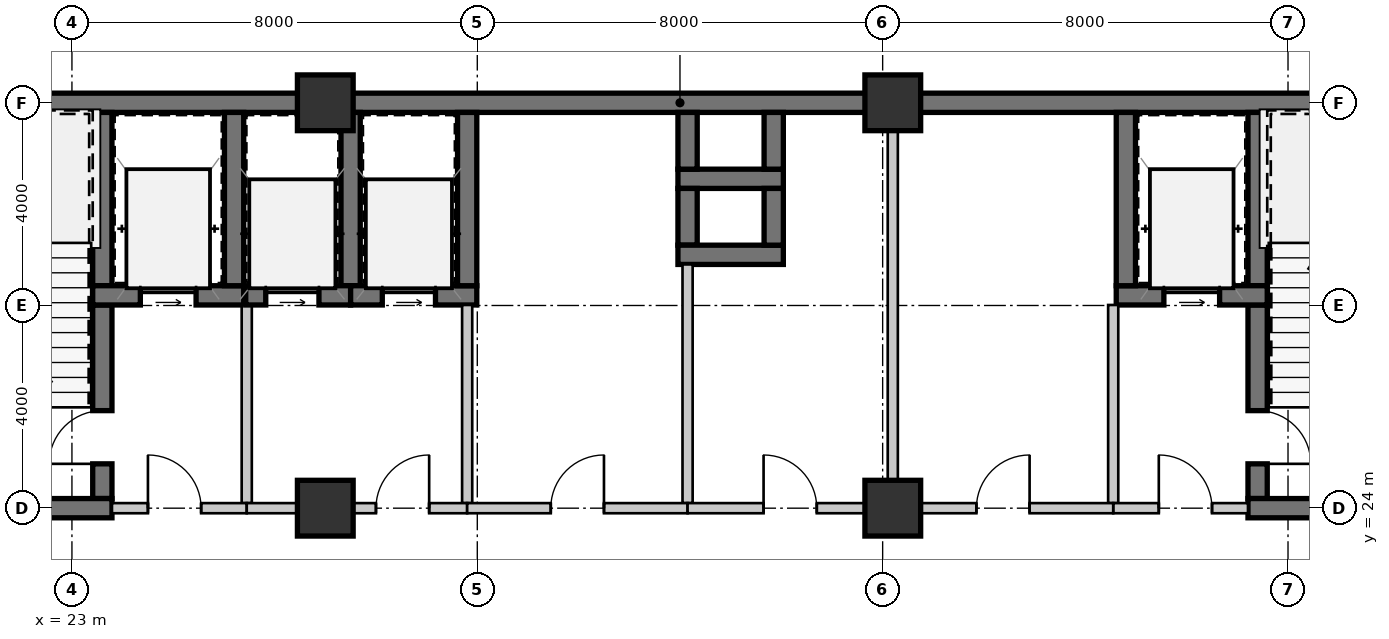
"""IFC4 building model, lengths in metres.
Left out: names, types, materials, properties, quantities, classifications, styles, units other than length and angle.
Written with IfcOpenShell. Run it as: python <this file> out.ifc"""

import sys

from ifc_helpers import new_model, si_unit, direction, frame, frame_2d, origin, origin_2d, place, context, subcontext, project, spatial, rectangle, extrude, source, transform, mapped, element, fill, save


model = new_model("IFC4")
c1 = context("Model", 3, precision=1e-05, world=origin(), true_north=direction((0.0, 1.0)))
c2 = subcontext(c1, "Body", "Model", "MODEL_VIEW")
j1 = project(units=[si_unit("LENGTHUNIT", "METRE"), si_unit("PLANEANGLEUNIT", "RADIAN")], contexts=[c1])
p1 = place(None, origin())
s1 = spatial("IfcSite", under=j1, at=p1, CompositionType="ELEMENT")
p2 = place(p1, origin())
s2 = spatial("IfcBuilding", under=s1, at=p2, CompositionType="ELEMENT")
p3 = place(p2, frame((0.0, 0.0, -4.0)))
s3 = spatial("IfcBuildingStorey", under=s2, at=p3, CompositionType="ELEMENT", Elevation=-4.0)
m1 = source(origin(), c2, "Body", "SweptSolid", [
    extrude(rectangle(XDim=1.1, YDim=1.1, at=origin_2d()), origin(), (0.0, 0.0, 1.0), 4.0),
])
for number, where, z_axis, x_axis in (
    (1, (28.0, 24.0, 0.0), (0.0, 0.0, 1.0), (1.0, 0.0, 0.0)),
    (2, (39.2, 24.0, 0.0), (0.0, 0.0, 1.0), (1.0, 0.0, 0.0)),
    (3, (28.0, 32.0, 0.0), (0.0, 0.0, 1.0), (1.0, 0.0, 0.0)),
    (4, (39.2, 32.0, 0.0), (0.0, 0.0, 1.0), (1.0, 0.0, 0.0)),
):
    element("IfcColumn", number, at=place(p3, frame(where, z_axis=z_axis, x_axis=x_axis)), inside=s3, PredefinedType="COLUMN", context=c2, shape_type="MappedRepresentation", body=[
        mapped(m1, transform((0.0, 0.0, 0.0), scale=1.0)),
    ])
m2 = source(origin(), c2, "Body", "SweptSolid", [
    extrude(rectangle(XDim=9.19, YDim=0.38, at=frame_2d((4.595, 0.0))), origin(), (0.0, 0.0, 1.0), 3.74),
])
p4 = place(p3, frame((18.81, 32.0, 0.0), z_axis=(0.0, 0.0, 1.0), x_axis=(1.0, 0.0, 0.0)))
e5 = element("IfcWall", 5, at=p4, inside=s3, PredefinedType="SHEAR", context=c2, shape_type="MappedRepresentation", body=[
    mapped(m2, transform((0.0, 0.0, 0.0), scale=1.0)),
])
m3 = source(origin(), c2, "Body", "SweptSolid", [
    extrude(rectangle(XDim=11.2, YDim=0.38, at=frame_2d((5.6, 0.0))), origin(), (0.0, 0.0, 1.0), 3.74),
])
p5 = place(p3, frame((28.0, 32.0, 0.0), z_axis=(0.0, 0.0, 1.0), x_axis=(1.0, 0.0, 0.0)))
e6 = element("IfcWall", 6, at=p5, inside=s3, PredefinedType="SHEAR", context=c2, shape_type="MappedRepresentation", body=[
    mapped(m3, transform((0.0, 0.0, 0.0), scale=1.0)),
])
m4 = source(origin(), c2, "Body", "SweptSolid", [
    extrude(rectangle(XDim=11.99, YDim=0.38, at=frame_2d((5.995, 0.0))), origin(), (0.0, 0.0, 1.0), 3.74),
])
p6 = place(p3, frame((39.2, 32.0, 0.0), z_axis=(0.0, 0.0, 1.0), x_axis=(1.0, 0.0, 0.0)))
e7 = element("IfcWall", 7, at=p6, inside=s3, PredefinedType="SHEAR", context=c2, shape_type="MappedRepresentation", body=[
    mapped(m4, transform((0.0, 0.0, 0.0), scale=1.0)),
])
m5 = source(origin(), c2, "Body", "SweptSolid", [
    extrude(rectangle(XDim=3.42, YDim=0.38, at=frame_2d((1.71, 0.0))), origin(), (0.0, 0.0, 1.0), 3.74),
])
p7 = place(p3, frame((23.6, 28.39, 0.0), z_axis=(0.0, 0.0, 1.0), x_axis=(0.0, 1.0, 0.0)))
e8 = element("IfcWall", 8, at=p7, inside=s3, PredefinedType="SHEAR", context=c2, shape_type="MappedRepresentation", body=[
    mapped(m5, transform((0.0, 0.0, 0.0), scale=1.0)),
])
m6 = source(origin(), c2, "Body", "SweptSolid", [
    extrude(rectangle(XDim=3.82, YDim=0.38, at=frame_2d((1.91, 0.0))), origin(), (0.0, 0.0, 1.0), 3.74),
])
p8 = place(p3, frame((23.6, 24.19, 0.0), z_axis=(0.0, 0.0, 1.0), x_axis=(0.0, 1.0, 0.0)))
e9 = element("IfcWall", 9, at=p8, inside=s3, PredefinedType="SHEAR", context=c2, shape_type="MappedRepresentation", body=[
    mapped(m6, transform((0.0, 0.0, 0.0), scale=1.0)),
])
m7 = source(origin(), c2, "Body", "SweptSolid", [
    extrude(rectangle(XDim=1.05, YDim=2.1, at=frame_2d((0.525, 1.05))), frame((0.0, 0.2, 0.0), z_axis=(0.0, -1.0, 0.0), x_axis=(1.0, 0.0, 0.0)), (0.0, 0.0, 1.0), 0.4),
])
p9 = place(p8, frame((0.685, 0.0, 0.0)))
e10 = element("IfcOpeningElement", 10, at=p9, cuts=e9, PredefinedType="OPENING", context=c2, shape_type="MappedRepresentation", body=[
    mapped(m7, transform((0.0, 0.0, 0.0), scale=1.0)),
])
m8 = source(origin(), c2, "Body", "SweptSolid", [
    extrude(rectangle(XDim=4.98, YDim=0.38, at=frame_2d((2.49, 0.0))), origin(), (0.0, 0.0, 1.0), 3.74),
])
p10 = place(p3, frame((18.81, 24.0, 0.0), z_axis=(0.0, 0.0, 1.0), x_axis=(1.0, 0.0, 0.0)))
e11 = element("IfcWall", 11, at=p10, inside=s3, PredefinedType="SHEAR", context=c2, shape_type="MappedRepresentation", body=[
    mapped(m8, transform((0.0, 0.0, 0.0), scale=1.0)),
])
m9 = source(origin(), c2, "Body", "SweptSolid", [
    extrude(rectangle(XDim=2.98, YDim=0.38, at=frame_2d((1.49, 0.0))), origin(), (0.0, 0.0, 1.0), 3.74),
])
p11 = place(p3, frame((23.41, 28.2, 0.0), z_axis=(0.0, 0.0, 1.0), x_axis=(1.0, 0.0, 0.0)))
e12 = element("IfcWall", 12, at=p11, inside=s3, PredefinedType="SHEAR", context=c2, shape_type="MappedRepresentation", body=[
    mapped(m9, transform((0.0, 0.0, 0.0), scale=1.0)),
])
m10 = source(origin(), c2, "Body", "SweptSolid", [
    extrude(rectangle(XDim=1.1, YDim=2.15, at=frame_2d((0.55, 1.075))), frame((0.0, 0.2, 0.0), z_axis=(0.0, -1.0, 0.0), x_axis=(1.0, 0.0, 0.0)), (0.0, 0.0, 1.0), 0.4),
])
p12 = place(p11, frame((0.94, 0.0, 0.0)))
e13 = element("IfcOpeningElement", 13, at=p12, cuts=e12, PredefinedType="OPENING", context=c2, shape_type="MappedRepresentation", body=[
    mapped(m10, transform((0.0, 0.0, 0.0), scale=1.0)),
])
p13 = place(p3, frame((26.2, 28.39, 0.0), z_axis=(0.0, 0.0, 1.0), x_axis=(0.0, 1.0, 0.0)))
e14 = element("IfcWall", 14, at=p13, inside=s3, PredefinedType="SHEAR", context=c2, shape_type="MappedRepresentation", body=[
    mapped(m5, transform((0.0, 0.0, 0.0), scale=1.0)),
])
m11 = source(origin(), c2, "Body", "SweptSolid", [
    extrude(rectangle(XDim=3.91, YDim=0.2, at=frame_2d((1.955, 0.0))), origin(), (0.0, 0.0, 1.0), 3.74),
])
p14 = place(p3, frame((26.45, 24.1, 0.0), z_axis=(0.0, 0.0, 1.0), x_axis=(0.0, 1.0, 0.0)))
e15 = element("IfcWall", 15, at=p14, inside=s3, PredefinedType="SOLIDWALL", context=c2, shape_type="MappedRepresentation", body=[
    mapped(m11, transform((0.0, 0.0, 0.0), scale=1.0)),
])
m12 = source(origin(), c2, "Body", "SweptSolid", [
    extrude(rectangle(XDim=2.66, YDim=0.2, at=frame_2d((1.33, 0.0))), origin(), (0.0, 0.0, 1.0), 3.28),
])
p15 = place(p3, frame((23.79, 24.0, 0.0), z_axis=(0.0, 0.0, 1.0), x_axis=(1.0, 0.0, 0.0)))
e16 = element("IfcWall", 16, at=p15, inside=s3, PredefinedType="SOLIDWALL", context=c2, shape_type="MappedRepresentation", body=[
    mapped(m12, transform((0.0, 0.0, 0.0), scale=1.0)),
])
m13 = source(origin(), c2, "Body", "SweptSolid", [
    extrude(rectangle(XDim=1.05, YDim=2.1, at=frame_2d((0.525, 1.05))), frame((0.0, 0.11, 0.0), z_axis=(0.0, -1.0, 0.0), x_axis=(1.0, 0.0, 0.0)), (0.0, 0.0, 1.0), 0.22),
])
p16 = place(p15, frame((0.71, 0.0, 0.0)))
e17 = element("IfcOpeningElement", 17, at=p16, cuts=e16, PredefinedType="OPENING", context=c2, shape_type="MappedRepresentation", body=[
    mapped(m13, transform((0.0, 0.0, 0.0), scale=1.0)),
])
p17 = place(p3, frame((46.4, 31.81, 0.0), z_axis=(0.0, 0.0, 1.0), x_axis=(0.0, -1.0, 0.0)))
e18 = element("IfcWall", 18, at=p17, inside=s3, PredefinedType="SHEAR", context=c2, shape_type="MappedRepresentation", body=[
    mapped(m5, transform((0.0, 0.0, 0.0), scale=1.0)),
])
p18 = place(p3, frame((46.4, 28.01, 0.0), z_axis=(0.0, 0.0, 1.0), x_axis=(0.0, -1.0, 0.0)))
e19 = element("IfcWall", 19, at=p18, inside=s3, PredefinedType="SHEAR", context=c2, shape_type="MappedRepresentation", body=[
    mapped(m6, transform((0.0, 0.0, 0.0), scale=1.0)),
])
p19 = place(p18, frame((2.085, 0.0, 0.0)))
e20 = element("IfcOpeningElement", 20, at=p19, cuts=e19, PredefinedType="OPENING", context=c2, shape_type="MappedRepresentation", body=[
    mapped(m7, transform((0.0, 0.0, 0.0), scale=1.0)),
])
p20 = place(p3, frame((46.21, 24.0, 0.0), z_axis=(0.0, 0.0, 1.0), x_axis=(1.0, 0.0, 0.0)))
e21 = element("IfcWall", 21, at=p20, inside=s3, PredefinedType="SHEAR", context=c2, shape_type="MappedRepresentation", body=[
    mapped(m8, transform((0.0, 0.0, 0.0), scale=1.0)),
])
p21 = place(p3, frame((43.61, 28.2, 0.0), z_axis=(0.0, 0.0, 1.0), x_axis=(1.0, 0.0, 0.0)))
e22 = element("IfcWall", 22, at=p21, inside=s3, PredefinedType="SHEAR", context=c2, shape_type="MappedRepresentation", body=[
    mapped(m9, transform((0.0, 0.0, 0.0), scale=1.0)),
])
p22 = place(p21, frame((0.94, 0.0, 0.0)))
e23 = element("IfcOpeningElement", 23, at=p22, cuts=e22, PredefinedType="OPENING", context=c2, shape_type="MappedRepresentation", body=[
    mapped(m10, transform((0.0, 0.0, 0.0), scale=1.0)),
])
p23 = place(p3, frame((43.8, 31.81, 0.0), z_axis=(0.0, 0.0, 1.0), x_axis=(0.0, -1.0, 0.0)))
e24 = element("IfcWall", 24, at=p23, inside=s3, PredefinedType="SHEAR", context=c2, shape_type="MappedRepresentation", body=[
    mapped(m5, transform((0.0, 0.0, 0.0), scale=1.0)),
])
p24 = place(p3, frame((43.55, 28.01, 0.0), z_axis=(0.0, 0.0, 1.0), x_axis=(0.0, -1.0, 0.0)))
e25 = element("IfcWall", 25, at=p24, inside=s3, PredefinedType="SOLIDWALL", context=c2, shape_type="MappedRepresentation", body=[
    mapped(m11, transform((0.0, 0.0, 0.0), scale=1.0)),
])
m14 = source(origin(), c2, "Body", "SweptSolid", [
    extrude(rectangle(XDim=2.66, YDim=0.2, at=frame_2d((1.33, 0.0))), origin(), (0.0, 0.0, 1.0), 3.207),
])
p25 = place(p3, frame((43.55, 24.0, 0.0), z_axis=(0.0, 0.0, 1.0), x_axis=(1.0, 0.0, 0.0)))
e26 = element("IfcWall", 26, at=p25, inside=s3, PredefinedType="SOLIDWALL", context=c2, shape_type="MappedRepresentation", body=[
    mapped(m14, transform((0.0, 0.0, 0.0), scale=1.0)),
])
p26 = place(p25, frame((0.9, 0.0, 0.0)))
e27 = element("IfcOpeningElement", 27, at=p26, cuts=e26, PredefinedType="OPENING", context=c2, shape_type="MappedRepresentation", body=[
    mapped(m13, transform((0.0, 0.0, 0.0), scale=1.0)),
])
m15 = source(origin(), c2, "Body", "SweptSolid", [
    extrude(rectangle(XDim=2.08, YDim=0.38, at=frame_2d((1.04, 0.0))), origin(), (0.0, 0.0, 1.0), 3.74),
])
p27 = place(p3, frame((34.96, 30.5, 0.0), z_axis=(0.0, 0.0, 1.0), x_axis=(1.0, 0.0, 0.0)))
e28 = element("IfcWall", 28, at=p27, inside=s3, PredefinedType="SHEAR", context=c2, shape_type="MappedRepresentation", body=[
    mapped(m15, transform((0.0, 0.0, 0.0), scale=1.0)),
])
m16 = source(origin(), c2, "Body", "SweptSolid", [
    extrude(rectangle(XDim=1.12, YDim=0.38, at=frame_2d((0.56, 0.0))), origin(), (0.0, 0.0, 1.0), 3.74),
])
for number, where, z_axis, x_axis in (
    (29, (35.15, 31.81, 0.0), (0.0, 0.0, 1.0), (0.0, -1.0, 0.0)),
    (30, (36.85, 30.69, 0.0), (0.0, 0.0, 1.0), (0.0, 1.0, 0.0)),
    (31, (35.15, 30.31, 0.0), (0.0, 0.0, 1.0), (0.0, -1.0, 0.0)),
):
    element("IfcWall", number, at=place(p3, frame(where, z_axis=z_axis, x_axis=x_axis)), inside=s3, PredefinedType="SHEAR", context=c2, shape_type="MappedRepresentation", body=[
        mapped(m16, transform((0.0, 0.0, 0.0), scale=1.0)),
    ])
p28 = place(p3, frame((34.96, 29.0, 0.0), z_axis=(0.0, 0.0, 1.0), x_axis=(1.0, 0.0, 0.0)))
e32 = element("IfcWall", 32, at=p28, inside=s3, PredefinedType="SHEAR", context=c2, shape_type="MappedRepresentation", body=[
    mapped(m15, transform((0.0, 0.0, 0.0), scale=1.0)),
])
p29 = place(p3, frame((36.85, 29.19, 0.0), z_axis=(0.0, 0.0, 1.0), x_axis=(0.0, 1.0, 0.0)))
e33 = element("IfcWall", 33, at=p29, inside=s3, PredefinedType="SHEAR", context=c2, shape_type="MappedRepresentation", body=[
    mapped(m16, transform((0.0, 0.0, 0.0), scale=1.0)),
])
p30 = place(p3, frame((28.5, 28.39, 0.0), z_axis=(0.0, 0.0, 1.0), x_axis=(0.0, 1.0, 0.0)))
e34 = element("IfcWall", 34, at=p30, inside=s3, PredefinedType="SHEAR", context=c2, shape_type="MappedRepresentation", body=[
    mapped(m5, transform((0.0, 0.0, 0.0), scale=1.0)),
])
m17 = source(origin(), c2, "Body", "SweptSolid", [
    extrude(rectangle(XDim=2.07, YDim=0.38, at=frame_2d((1.035, 0.0))), origin(), (0.0, 0.0, 1.0), 3.74),
])
p31 = place(p3, frame((26.43, 28.2, 0.0), z_axis=(0.0, 0.0, 1.0), x_axis=(1.0, 0.0, 0.0)))
e35 = element("IfcWall", 35, at=p31, inside=s3, PredefinedType="SHEAR", context=c2, shape_type="MappedRepresentation", body=[
    mapped(m17, transform((0.0, 0.0, 0.0), scale=1.0)),
])
m18 = source(origin(), c2, "Body", "SweptSolid", [
    extrude(rectangle(XDim=1.05, YDim=2.15, at=frame_2d((0.525, 1.075))), frame((0.0, 0.2, 0.0), z_axis=(0.0, -1.0, 0.0), x_axis=(1.0, 0.0, 0.0)), (0.0, 0.0, 1.0), 0.4),
])
p32 = place(p31, frame((0.395, 0.0, 0.0)))
e36 = element("IfcOpeningElement", 36, at=p32, cuts=e35, PredefinedType="OPENING", context=c2, shape_type="MappedRepresentation", body=[
    mapped(m18, transform((0.0, 0.0, 0.0), scale=1.0)),
])
m19 = source(origin(), c2, "Body", "SweptSolid", [
    extrude(rectangle(XDim=2.49, YDim=0.38, at=frame_2d((1.245, 0.0))), origin(), (0.0, 0.0, 1.0), 3.74),
])
p33 = place(p3, frame((28.5, 28.2, 0.0), z_axis=(0.0, 0.0, 1.0), x_axis=(1.0, 0.0, 0.0)))
e37 = element("IfcWall", 37, at=p33, inside=s3, PredefinedType="SHEAR", context=c2, shape_type="MappedRepresentation", body=[
    mapped(m19, transform((0.0, 0.0, 0.0), scale=1.0)),
])
p34 = place(p33, frame((0.625, 0.0, 0.0)))
e38 = element("IfcOpeningElement", 38, at=p34, cuts=e37, PredefinedType="OPENING", context=c2, shape_type="MappedRepresentation", body=[
    mapped(m18, transform((0.0, 0.0, 0.0), scale=1.0)),
])
p35 = place(p3, frame((30.8, 28.39, 0.0), z_axis=(0.0, 0.0, 1.0), x_axis=(0.0, 1.0, 0.0)))
e39 = element("IfcWall", 39, at=p35, inside=s3, PredefinedType="SHEAR", context=c2, shape_type="MappedRepresentation", body=[
    mapped(m5, transform((0.0, 0.0, 0.0), scale=1.0)),
])
p36 = place(p3, frame((30.8, 28.01, 0.0), z_axis=(0.0, 0.0, 1.0), x_axis=(0.0, -1.0, 0.0)))
e40 = element("IfcWall", 40, at=p36, inside=s3, PredefinedType="SOLIDWALL", context=c2, shape_type="MappedRepresentation", body=[
    mapped(m11, transform((0.0, 0.0, 0.0), scale=1.0)),
])
m20 = source(origin(), c2, "Body", "SweptSolid", [
    extrude(rectangle(XDim=4.35, YDim=0.2, at=frame_2d((2.175, 0.0))), origin(), (0.0, 0.0, 1.0), 3.28),
])
p37 = place(p3, frame((30.8, 24.0, 0.0), z_axis=(0.0, 0.0, 1.0), x_axis=(-1.0, 0.0, 0.0)))
e41 = element("IfcWall", 41, at=p37, inside=s3, PredefinedType="SOLIDWALL", context=c2, shape_type="MappedRepresentation", body=[
    mapped(m20, transform((0.0, 0.0, 0.0), scale=1.0)),
])
p38 = place(p37, frame((0.75, 0.0, 0.0)))
e42 = element("IfcOpeningElement", 42, at=p38, cuts=e41, PredefinedType="OPENING", context=c2, shape_type="MappedRepresentation", body=[
    mapped(m13, transform((0.0, 0.0, 0.0), scale=1.0)),
])
m21 = source(origin(), c2, "Body", "SweptSolid", [
    extrude(rectangle(XDim=4.71, YDim=0.2, at=frame_2d((2.355, 0.0))), origin(), (0.0, 0.0, 1.0), 3.74),
])
p39 = place(p3, frame((35.15, 28.81, 0.0), z_axis=(0.0, 0.0, 1.0), x_axis=(0.0, -1.0, 0.0)))
e43 = element("IfcWall", 43, at=p39, inside=s3, PredefinedType="SOLIDWALL", context=c2, shape_type="MappedRepresentation", body=[
    mapped(m21, transform((0.0, 0.0, 0.0), scale=1.0)),
])
m22 = source(origin(), c2, "Body", "SweptSolid", [
    extrude(rectangle(XDim=4.35, YDim=0.2, at=frame_2d((2.175, 0.0))), origin(), (0.0, 0.0, 1.0), 3.28),
])
p40 = place(p3, frame((35.15, 24.0, 0.0), z_axis=(0.0, 0.0, 1.0), x_axis=(-1.0, 0.0, 0.0)))
e44 = element("IfcWall", 44, at=p40, inside=s3, PredefinedType="SOLIDWALL", context=c2, shape_type="MappedRepresentation", body=[
    mapped(m22, transform((0.0, 0.0, 0.0), scale=1.0)),
])
p41 = place(p40, frame((1.65, 0.0, 0.0)))
e45 = element("IfcOpeningElement", 45, at=p41, cuts=e44, PredefinedType="OPENING", context=c2, shape_type="MappedRepresentation", body=[
    mapped(m13, transform((0.0, 0.0, 0.0), scale=1.0)),
])
m23 = source(origin(), c2, "Body", "SweptSolid", [
    extrude(rectangle(XDim=7.71, YDim=0.2, at=frame_2d((3.855, 0.0))), origin(), (0.0, 0.0, 1.0), 3.28),
])
p42 = place(p3, frame((39.2, 31.81, 0.0), z_axis=(0.0, 0.0, 1.0), x_axis=(0.0, -1.0, 0.0)))
e46 = element("IfcWall", 46, at=p42, inside=s3, PredefinedType="SOLIDWALL", context=c2, shape_type="MappedRepresentation", body=[
    mapped(m23, transform((0.0, 0.0, 0.0), scale=1.0)),
])
m24 = source(origin(), c2, "Body", "SweptSolid", [
    extrude(rectangle(XDim=4.05, YDim=0.2, at=frame_2d((2.025, 0.0))), origin(), (0.0, 0.0, 1.0), 3.28),
])
p43 = place(p3, frame((39.2, 24.0, 0.0), z_axis=(0.0, 0.0, 1.0), x_axis=(-1.0, 0.0, 0.0)))
e47 = element("IfcWall", 47, at=p43, inside=s3, PredefinedType="SOLIDWALL", context=c2, shape_type="MappedRepresentation", body=[
    mapped(m24, transform((0.0, 0.0, 0.0), scale=1.0)),
])
p44 = place(p43, frame((1.5, 0.0, 0.0)))
e48 = element("IfcOpeningElement", 48, at=p44, cuts=e47, PredefinedType="OPENING", context=c2, shape_type="MappedRepresentation", body=[
    mapped(m13, transform((0.0, 0.0, 0.0), scale=1.0)),
])
m25 = source(origin(), c2, "Body", "SweptSolid", [
    extrude(rectangle(XDim=4.35, YDim=0.2, at=frame_2d((2.175, 0.0))), origin(), (0.0, 0.0, 1.0), 3.207),
])
p45 = place(p3, frame((43.55, 24.0, 0.0), z_axis=(0.0, 0.0, 1.0), x_axis=(-1.0, 0.0, 0.0)))
e49 = element("IfcWall", 49, at=p45, inside=s3, PredefinedType="SOLIDWALL", context=c2, shape_type="MappedRepresentation", body=[
    mapped(m25, transform((0.0, 0.0, 0.0), scale=1.0)),
])
p46 = place(p45, frame((1.65, 0.0, 0.0)))
e50 = element("IfcOpeningElement", 50, at=p46, cuts=e49, PredefinedType="OPENING", context=c2, shape_type="MappedRepresentation", body=[
    mapped(m13, transform((0.0, 0.0, 0.0), scale=1.0)),
])
m26 = source(origin(), c2, "Body", "SweptSolid", [
    extrude(rectangle(XDim=1.05, YDim=2.1, at=frame_2d((0.525, 1.05))), frame((0.0, 0.025, 0.0), z_axis=(0.0, -1.0, 0.0), x_axis=(1.0, 0.0, 0.0)), (0.0, 0.0, 1.0), 0.05),
])
p47 = place(p9, origin())
e51 = element("IfcDoor", 51, at=p47, inside=s3, OperationType="SINGLE_SWING_LEFT", PredefinedType="DOOR", context=c2, shape_type="MappedRepresentation", body=[
    mapped(m26, transform((0.0, 0.0, 0.0), scale=1.0)),
])
fill(e10, e51)
m27 = source(origin(), c2, "Body", "SweptSolid", [
    extrude(rectangle(XDim=1.1, YDim=2.15, at=frame_2d((0.55, 1.075))), frame((0.0, 0.025, 0.0), z_axis=(0.0, -1.0, 0.0), x_axis=(1.0, 0.0, 0.0)), (0.0, 0.0, 1.0), 0.05),
])
p48 = place(p12, origin())
e52 = element("IfcDoor", 52, at=p48, inside=s3, OperationType="SLIDING_TO_LEFT", PredefinedType="DOOR", context=c2, shape_type="MappedRepresentation", body=[
    mapped(m27, transform((0.0, 0.0, 0.0), scale=1.0)),
])
fill(e13, e52)
p49 = place(p16, origin())
e53 = element("IfcDoor", 53, at=p49, inside=s3, OperationType="SINGLE_SWING_LEFT", PredefinedType="DOOR", context=c2, shape_type="MappedRepresentation", body=[
    mapped(m26, transform((0.0, 0.0, 0.0), scale=1.0)),
])
fill(e17, e53)
p50 = place(p19, origin())
e54 = element("IfcDoor", 54, at=p50, inside=s3, OperationType="SINGLE_SWING_RIGHT", PredefinedType="DOOR", context=c2, shape_type="MappedRepresentation", body=[
    mapped(m26, transform((0.0, 0.0, 0.0), scale=1.0)),
])
fill(e20, e54)
p51 = place(p22, origin())
e55 = element("IfcDoor", 55, at=p51, inside=s3, OperationType="SLIDING_TO_LEFT", PredefinedType="DOOR", context=c2, shape_type="MappedRepresentation", body=[
    mapped(m27, transform((0.0, 0.0, 0.0), scale=1.0)),
])
fill(e23, e55)
p52 = place(p26, origin())
e56 = element("IfcDoor", 56, at=p52, inside=s3, OperationType="SINGLE_SWING_LEFT", PredefinedType="DOOR", context=c2, shape_type="MappedRepresentation", body=[
    mapped(m26, transform((0.0, 0.0, 0.0), scale=1.0)),
])
fill(e27, e56)
m28 = source(origin(), c2, "Body", "SweptSolid", [
    extrude(rectangle(XDim=1.05, YDim=2.15, at=frame_2d((0.525, 1.075))), frame((0.0, 0.025, 0.0), z_axis=(0.0, -1.0, 0.0), x_axis=(1.0, 0.0, 0.0)), (0.0, 0.0, 1.0), 0.05),
])
p53 = place(p32, origin())
e57 = element("IfcDoor", 57, at=p53, inside=s3, OperationType="SLIDING_TO_LEFT", PredefinedType="DOOR", context=c2, shape_type="MappedRepresentation", body=[
    mapped(m28, transform((0.0, 0.0, 0.0), scale=1.0)),
])
fill(e36, e57)
p54 = place(p34, origin())
e58 = element("IfcDoor", 58, at=p54, inside=s3, OperationType="SLIDING_TO_LEFT", PredefinedType="DOOR", context=c2, shape_type="MappedRepresentation", body=[
    mapped(m28, transform((0.0, 0.0, 0.0), scale=1.0)),
])
fill(e38, e58)
p55 = place(p38, frame((1.05, 0.0, 0.0), z_axis=(0.0, 0.0, 1.0), x_axis=(-1.0, 0.0, 0.0)))
e59 = element("IfcDoor", 59, at=p55, inside=s3, OperationType="SINGLE_SWING_RIGHT", PredefinedType="DOOR", context=c2, shape_type="MappedRepresentation", body=[
    mapped(m26, transform((0.0, 0.0, 0.0), scale=1.0)),
])
fill(e42, e59)
p56 = place(p41, frame((1.05, 0.0, 0.0), z_axis=(0.0, 0.0, 1.0), x_axis=(-1.0, 0.0, 0.0)))
e60 = element("IfcDoor", 60, at=p56, inside=s3, OperationType="SINGLE_SWING_RIGHT", PredefinedType="DOOR", context=c2, shape_type="MappedRepresentation", body=[
    mapped(m26, transform((0.0, 0.0, 0.0), scale=1.0)),
])
fill(e45, e60)
p57 = place(p44, frame((1.05, 0.0, 0.0), z_axis=(0.0, 0.0, 1.0), x_axis=(-1.0, 0.0, 0.0)))
e61 = element("IfcDoor", 61, at=p57, inside=s3, OperationType="SINGLE_SWING_LEFT", PredefinedType="DOOR", context=c2, shape_type="MappedRepresentation", body=[
    mapped(m26, transform((0.0, 0.0, 0.0), scale=1.0)),
])
fill(e48, e61)
p58 = place(p46, frame((1.05, 0.0, 0.0), z_axis=(0.0, 0.0, 1.0), x_axis=(-1.0, 0.0, 0.0)))
e62 = element("IfcDoor", 62, at=p58, inside=s3, OperationType="SINGLE_SWING_RIGHT", PredefinedType="DOOR", context=c2, shape_type="MappedRepresentation", body=[
    mapped(m26, transform((0.0, 0.0, 0.0), scale=1.0)),
])
fill(e50, e62)
save(model, sys.argv[1])
